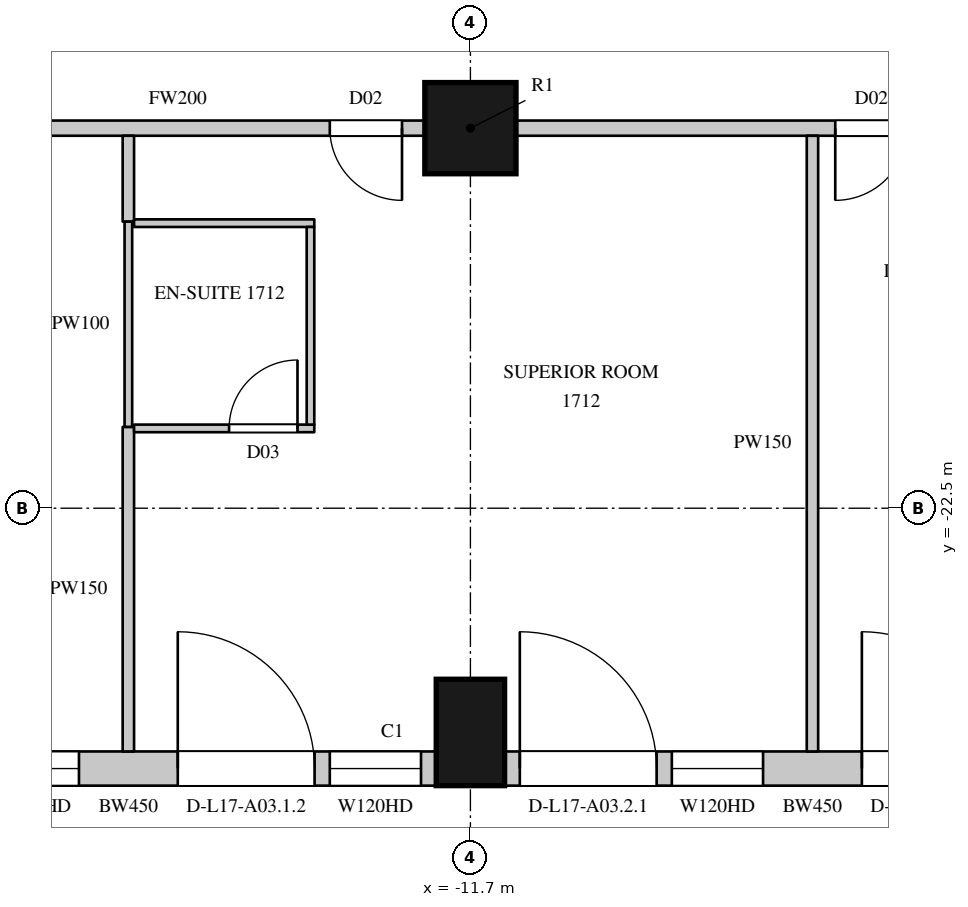
"""IFC4 building model, lengths in metres.
Left out: names, types, materials, properties, quantities, classifications, styles, units other than length and angle.
Written with IfcOpenShell. Run it as: python <this file> out.ifc"""

import sys

from ifc_helpers import new_model, si_unit, direction, frame, frame_2d, origin, origin_2d, place, context, subcontext, project, spatial, rectangle, circle, extrude, element, fill, save


model = new_model("IFC4")
c1 = context("Model", 3, precision=1e-05, world=origin(), true_north=direction((0.0, 1.0)))
c2 = subcontext(c1, "Body", "Model", "MODEL_VIEW")
j1 = project(units=[si_unit("LENGTHUNIT", "METRE"), si_unit("PLANEANGLEUNIT", "RADIAN")], contexts=[c1])
p1 = place(None, origin())
s1 = spatial("IfcSite", under=j1, at=p1, CompositionType="ELEMENT")
p2 = place(p1, origin())
s2 = spatial("IfcBuilding", under=s1, at=p2, CompositionType="ELEMENT")
p3 = place(p2, frame((0.0, 0.0, 91.5)))
s3 = spatial("IfcBuildingStorey", under=s2, at=p3, CompositionType="ELEMENT", Elevation=91.5)
p4 = place(p3, frame((-11.7, -25.45, 0.0), z_axis=(0.0, 0.0, 1.0), x_axis=(1.0, 0.0, 0.0)))
e1 = element("IfcColumn", 1, at=p4, inside=s3, PredefinedType="COLUMN", context=c2, shape_type="SweptSolid", body=[
    extrude(rectangle(XDim=0.9, YDim=1.4, at=origin_2d()), origin(), (0.0, 0.0, 1.0), 3.6),
])
p5 = place(p3, frame((-11.7, -17.5, 0.0), z_axis=(0.0, 0.0, 1.0), x_axis=(1.0, 0.0, 0.0)))
e2 = element("IfcColumn", 2, at=p5, inside=s3, PredefinedType="COLUMN", context=c2, shape_type="SweptSolid", body=[
    extrude(circle(Radius=0.6, at=origin_2d()), origin(), (0.0, 0.0, 1.0), 3.6),
])
p6 = place(p3, frame((-20.25, -25.925, 0.0), z_axis=(0.0, 0.0, 1.0), x_axis=(1.0, 0.0, 0.0)))
e3 = element("IfcWall", 3, at=p6, inside=s3, PredefinedType="SOLIDWALL", context=c2, shape_type="SweptSolid", body=[
    extrude(rectangle(XDim=8.1, YDim=0.45, at=frame_2d((4.05, 0.0))), origin(), (0.0, 0.0, 1.0), 3.3),
])
p7 = place(p6, frame((0.2, 0.0, 0.0)))
e4 = element("IfcOpeningElement", 4, at=p7, cuts=e3, PredefinedType="OPENING", context=c2, shape_type="SweptSolid", body=[
    extrude(rectangle(XDim=1.8, YDim=2.4, at=frame_2d((0.9, 1.2))), frame((0.0, 0.235, 0.0), z_axis=(0.0, -1.0, 0.0), x_axis=(1.0, 0.0, 0.0)), (0.0, 0.0, 1.0), 0.47),
])
p8 = place(p6, frame((2.2, 0.0, 1.05)))
e5 = element("IfcOpeningElement", 5, at=p8, cuts=e3, PredefinedType="OPENING", context=c2, shape_type="SweptSolid", body=[
    extrude(rectangle(XDim=1.2, YDim=2.0, at=frame_2d((0.6, 1.0))), frame((0.0, 0.235, 0.0), z_axis=(0.0, -1.0, 0.0), x_axis=(1.0, 0.0, 0.0)), (0.0, 0.0, 1.0), 0.47),
])
p9 = place(p6, frame((4.7, 0.0, 0.0)))
e6 = element("IfcOpeningElement", 6, at=p9, cuts=e3, PredefinedType="OPENING", context=c2, shape_type="SweptSolid", body=[
    extrude(rectangle(XDim=1.8, YDim=2.4, at=frame_2d((0.9, 1.2))), frame((0.0, 0.235, 0.0), z_axis=(0.0, -1.0, 0.0), x_axis=(1.0, 0.0, 0.0)), (0.0, 0.0, 1.0), 0.47),
])
p10 = place(p6, frame((6.7, 0.0, 1.05)))
e7 = element("IfcOpeningElement", 7, at=p10, cuts=e3, PredefinedType="OPENING", context=c2, shape_type="SweptSolid", body=[
    extrude(rectangle(XDim=1.2, YDim=2.0, at=frame_2d((0.6, 1.0))), frame((0.0, 0.235, 0.0), z_axis=(0.0, -1.0, 0.0), x_axis=(1.0, 0.0, 0.0)), (0.0, 0.0, 1.0), 0.47),
])
p11 = place(p3, frame((-11.25, -25.925, 0.0), z_axis=(0.0, 0.0, 1.0), x_axis=(1.0, 0.0, 0.0)))
e8 = element("IfcWall", 8, at=p11, inside=s3, PredefinedType="SOLIDWALL", context=c2, shape_type="SweptSolid", body=[
    extrude(rectangle(XDim=8.1, YDim=0.45, at=frame_2d((4.05, 0.0))), origin(), (0.0, 0.0, 1.0), 3.3),
])
p12 = place(p11, frame((0.2, 0.0, 0.0)))
e9 = element("IfcOpeningElement", 9, at=p12, cuts=e8, PredefinedType="OPENING", context=c2, shape_type="SweptSolid", body=[
    extrude(rectangle(XDim=1.8, YDim=2.4, at=frame_2d((0.9, 1.2))), frame((0.0, 0.235, 0.0), z_axis=(0.0, -1.0, 0.0), x_axis=(1.0, 0.0, 0.0)), (0.0, 0.0, 1.0), 0.47),
])
p13 = place(p11, frame((2.2, 0.0, 1.05)))
e10 = element("IfcOpeningElement", 10, at=p13, cuts=e8, PredefinedType="OPENING", context=c2, shape_type="SweptSolid", body=[
    extrude(rectangle(XDim=1.2, YDim=2.0, at=frame_2d((0.6, 1.0))), frame((0.0, 0.235, 0.0), z_axis=(0.0, -1.0, 0.0), x_axis=(1.0, 0.0, 0.0)), (0.0, 0.0, 1.0), 0.47),
])
p14 = place(p11, frame((4.7, 0.0, 0.0)))
e11 = element("IfcOpeningElement", 11, at=p14, cuts=e8, PredefinedType="OPENING", context=c2, shape_type="SweptSolid", body=[
    extrude(rectangle(XDim=1.8, YDim=2.4, at=frame_2d((0.9, 1.2))), frame((0.0, 0.235, 0.0), z_axis=(0.0, -1.0, 0.0), x_axis=(1.0, 0.0, 0.0)), (0.0, 0.0, 1.0), 0.47),
])
p15 = place(p11, frame((6.7, 0.0, 1.05)))
e12 = element("IfcOpeningElement", 12, at=p15, cuts=e8, PredefinedType="OPENING", context=c2, shape_type="SweptSolid", body=[
    extrude(rectangle(XDim=1.2, YDim=2.0, at=frame_2d((0.6, 1.0))), frame((0.0, 0.235, 0.0), z_axis=(0.0, -1.0, 0.0), x_axis=(1.0, 0.0, 0.0)), (0.0, 0.0, 1.0), 0.47),
])
p16 = place(p3, frame((-18.8, -17.5, 0.0), z_axis=(0.0, 0.0, 1.0), x_axis=(1.0, 0.0, 0.0)))
e13 = element("IfcWall", 13, at=p16, inside=s3, PredefinedType="PARTITIONING", context=c2, shape_type="SweptSolid", body=[
    extrude(rectangle(XDim=6.5, YDim=0.2, at=frame_2d((3.25, 0.0))), origin(), (0.0, 0.0, 1.0), 2.75),
])
p17 = place(p16, frame((5.25, 0.0, 0.0)))
e14 = element("IfcOpeningElement", 14, at=p17, cuts=e13, PredefinedType="OPENING", context=c2, shape_type="SweptSolid", body=[
    extrude(rectangle(XDim=0.95, YDim=2.2, at=frame_2d((0.475, 1.1))), frame((0.0, 0.11, 0.0), z_axis=(0.0, -1.0, 0.0), x_axis=(1.0, 0.0, 0.0)), (0.0, 0.0, 1.0), 0.22),
])
p18 = place(p3, frame((-11.1, -17.5, 0.0), z_axis=(0.0, 0.0, 1.0), x_axis=(1.0, 0.0, 0.0)))
e15 = element("IfcWall", 15, at=p18, inside=s3, PredefinedType="PARTITIONING", context=c2, shape_type="SweptSolid", body=[
    extrude(rectangle(XDim=7.8, YDim=0.2, at=frame_2d((3.9, 0.0))), origin(), (0.0, 0.0, 1.0), 2.75),
])
p19 = place(p18, frame((4.2, 0.0, 0.0)))
e16 = element("IfcOpeningElement", 16, at=p19, cuts=e15, PredefinedType="OPENING", context=c2, shape_type="SweptSolid", body=[
    extrude(rectangle(XDim=0.95, YDim=2.2, at=frame_2d((0.475, 1.1))), frame((0.0, 0.11, 0.0), z_axis=(0.0, -1.0, 0.0), x_axis=(1.0, 0.0, 0.0)), (0.0, 0.0, 1.0), 0.22),
])
p20 = place(p3, frame((-16.2, -25.7, 0.0), z_axis=(0.0, 0.0, 1.0), x_axis=(0.0, 1.0, 0.0)))
e17 = element("IfcWall", 17, at=p20, inside=s3, PredefinedType="PARTITIONING", context=c2, shape_type="SweptSolid", body=[
    extrude(rectangle(XDim=4.27, YDim=0.15, at=frame_2d((2.135, 0.0))), origin(), (0.0, 0.0, 1.0), 2.65),
])
p21 = place(p3, frame((-16.2, -18.73, 0.0), z_axis=(0.0, 0.0, 1.0), x_axis=(0.0, 1.0, 0.0)))
e18 = element("IfcWall", 18, at=p21, inside=s3, PredefinedType="PARTITIONING", context=c2, shape_type="SweptSolid", body=[
    extrude(rectangle(XDim=1.13, YDim=0.15, at=frame_2d((0.565, 0.0))), origin(), (0.0, 0.0, 1.0), 2.65),
])
p22 = place(p3, frame((-7.2, -25.7, 0.0), z_axis=(0.0, 0.0, 1.0), x_axis=(0.0, 1.0, 0.0)))
e19 = element("IfcWall", 19, at=p22, inside=s3, PredefinedType="PARTITIONING", context=c2, shape_type="SweptSolid", body=[
    extrude(rectangle(XDim=8.1, YDim=0.15, at=frame_2d((4.05, 0.0))), origin(), (0.0, 0.0, 1.0), 2.65),
])
p23 = place(p3, frame((-16.2, -21.43, 0.0), z_axis=(0.0, 0.0, 1.0), x_axis=(0.0, 1.0, 0.0)))
e20 = element("IfcWall", 20, at=p23, inside=s3, PredefinedType="PARTITIONING", context=c2, shape_type="SweptSolid", body=[
    extrude(rectangle(XDim=2.7, YDim=0.1, at=frame_2d((1.35, 0.0))), origin(), (0.0, 0.0, 1.0), 2.65),
])
p24 = place(p3, frame((-16.125, -21.45, 0.0), z_axis=(0.0, 0.0, 1.0), x_axis=(1.0, 0.0, 0.0)))
e21 = element("IfcWall", 21, at=p24, inside=s3, PredefinedType="PARTITIONING", context=c2, shape_type="SweptSolid", body=[
    extrude(rectangle(XDim=2.371, YDim=0.1, at=frame_2d((1.186, 0.0))), origin(), (0.0, 0.0, 1.0), 3.3),
])
p25 = place(p24, frame((1.25, 0.0, 0.0)))
e22 = element("IfcOpeningElement", 22, at=p25, cuts=e21, PredefinedType="OPENING", context=c2, shape_type="SweptSolid", body=[
    extrude(rectangle(XDim=0.9, YDim=2.2, at=frame_2d((0.45, 1.1))), frame((0.0, 0.06, 0.0), z_axis=(0.0, -1.0, 0.0), x_axis=(1.0, 0.0, 0.0)), (0.0, 0.0, 1.0), 0.12),
])
p26 = place(p3, frame((-16.125, -18.75, 0.0), z_axis=(0.0, 0.0, 1.0), x_axis=(1.0, 0.0, 0.0)))
e23 = element("IfcWall", 23, at=p26, inside=s3, PredefinedType="PARTITIONING", context=c2, shape_type="SweptSolid", body=[
    extrude(rectangle(XDim=2.371, YDim=0.1, at=frame_2d((1.186, 0.0))), origin(), (0.0, 0.0, 1.0), 3.3),
])
p27 = place(p3, frame((-13.804, -21.4, 0.0), z_axis=(0.0, 0.0, 1.0), x_axis=(0.0, 1.0, 0.0)))
e24 = element("IfcWall", 24, at=p27, inside=s3, PredefinedType="PARTITIONING", context=c2, shape_type="SweptSolid", body=[
    extrude(rectangle(XDim=2.6, YDim=0.1, at=frame_2d((1.3, 0.0))), origin(), (0.0, 0.0, 1.0), 3.3),
])
p28 = place(p8, origin())
e25 = element("IfcWindow", 25, at=p28, inside=s3, PartitioningType="SINGLE_PANEL", PredefinedType="WINDOW", context=c2, shape_type="SweptSolid", body=[
    extrude(rectangle(XDim=1.2, YDim=2.0, at=frame_2d((0.6, 1.0))), frame((0.0, 0.135, 0.0), z_axis=(0.0, -1.0, 0.0), x_axis=(1.0, 0.0, 0.0)), (0.0, 0.0, 1.0), 0.06),
])
fill(e5, e25)
p29 = place(p9, origin())
e26 = element("IfcDoor", 26, at=p29, inside=s3, OperationType="SLIDING_TO_LEFT", PredefinedType="DOOR", context=c2, shape_type="SweptSolid", body=[
    extrude(rectangle(XDim=1.8, YDim=2.4, at=frame_2d((0.9, 1.2))), frame((0.0, 0.13, 0.0), z_axis=(0.0, -1.0, 0.0), x_axis=(1.0, 0.0, 0.0)), (0.0, 0.0, 1.0), 0.05),
])
fill(e6, e26)
p30 = place(p10, origin())
e27 = element("IfcWindow", 27, at=p30, inside=s3, PartitioningType="SINGLE_PANEL", PredefinedType="WINDOW", context=c2, shape_type="SweptSolid", body=[
    extrude(rectangle(XDim=1.2, YDim=2.0, at=frame_2d((0.6, 1.0))), frame((0.0, 0.135, 0.0), z_axis=(0.0, -1.0, 0.0), x_axis=(1.0, 0.0, 0.0)), (0.0, 0.0, 1.0), 0.06),
])
fill(e7, e27)
p31 = place(p12, origin())
e28 = element("IfcDoor", 28, at=p31, inside=s3, OperationType="SLIDING_TO_LEFT", PredefinedType="DOOR", context=c2, shape_type="SweptSolid", body=[
    extrude(rectangle(XDim=1.8, YDim=2.4, at=frame_2d((0.9, 1.2))), frame((0.0, 0.13, 0.0), z_axis=(0.0, -1.0, 0.0), x_axis=(1.0, 0.0, 0.0)), (0.0, 0.0, 1.0), 0.05),
])
fill(e9, e28)
p32 = place(p13, origin())
e29 = element("IfcWindow", 29, at=p32, inside=s3, PartitioningType="SINGLE_PANEL", PredefinedType="WINDOW", context=c2, shape_type="SweptSolid", body=[
    extrude(rectangle(XDim=1.2, YDim=2.0, at=frame_2d((0.6, 1.0))), frame((0.0, 0.135, 0.0), z_axis=(0.0, -1.0, 0.0), x_axis=(1.0, 0.0, 0.0)), (0.0, 0.0, 1.0), 0.06),
])
fill(e10, e29)
p33 = place(p14, origin())
e30 = element("IfcDoor", 30, at=p33, inside=s3, OperationType="SLIDING_TO_LEFT", PredefinedType="DOOR", context=c2, shape_type="SweptSolid", body=[
    extrude(rectangle(XDim=1.8, YDim=2.4, at=frame_2d((0.9, 1.2))), frame((0.0, 0.13, 0.0), z_axis=(0.0, -1.0, 0.0), x_axis=(1.0, 0.0, 0.0)), (0.0, 0.0, 1.0), 0.05),
])
fill(e11, e30)
p34 = place(p17, origin())
e31 = element("IfcDoor", 31, at=p34, inside=s3, OperationType="SINGLE_SWING_LEFT", PredefinedType="DOOR", context=c2, shape_type="SweptSolid", body=[
    extrude(rectangle(XDim=0.95, YDim=2.2, at=frame_2d((0.475, 1.1))), frame((0.0, 0.025, 0.0), z_axis=(0.0, -1.0, 0.0), x_axis=(1.0, 0.0, 0.0)), (0.0, 0.0, 1.0), 0.05),
])
fill(e14, e31)
p35 = place(p25, origin())
e32 = element("IfcDoor", 32, at=p35, inside=s3, OperationType="SINGLE_SWING_RIGHT", PredefinedType="DOOR", context=c2, shape_type="SweptSolid", body=[
    extrude(rectangle(XDim=0.9, YDim=2.2, at=frame_2d((0.45, 1.1))), frame((0.0, 0.025, 0.0), z_axis=(0.0, -1.0, 0.0), x_axis=(1.0, 0.0, 0.0)), (0.0, 0.0, 1.0), 0.05),
])
fill(e22, e32)
p36 = place(p19, origin())
e33 = element("IfcDoor", 33, at=p36, inside=s3, OperationType="SINGLE_SWING_RIGHT", PredefinedType="DOOR", context=c2, shape_type="SweptSolid", body=[
    extrude(rectangle(XDim=0.95, YDim=2.2, at=frame_2d((0.475, 1.1))), frame((0.0, 0.025, 0.0), z_axis=(0.0, -1.0, 0.0), x_axis=(1.0, 0.0, 0.0)), (0.0, 0.0, 1.0), 0.05),
])
fill(e16, e33)
save(model, sys.argv[1])
